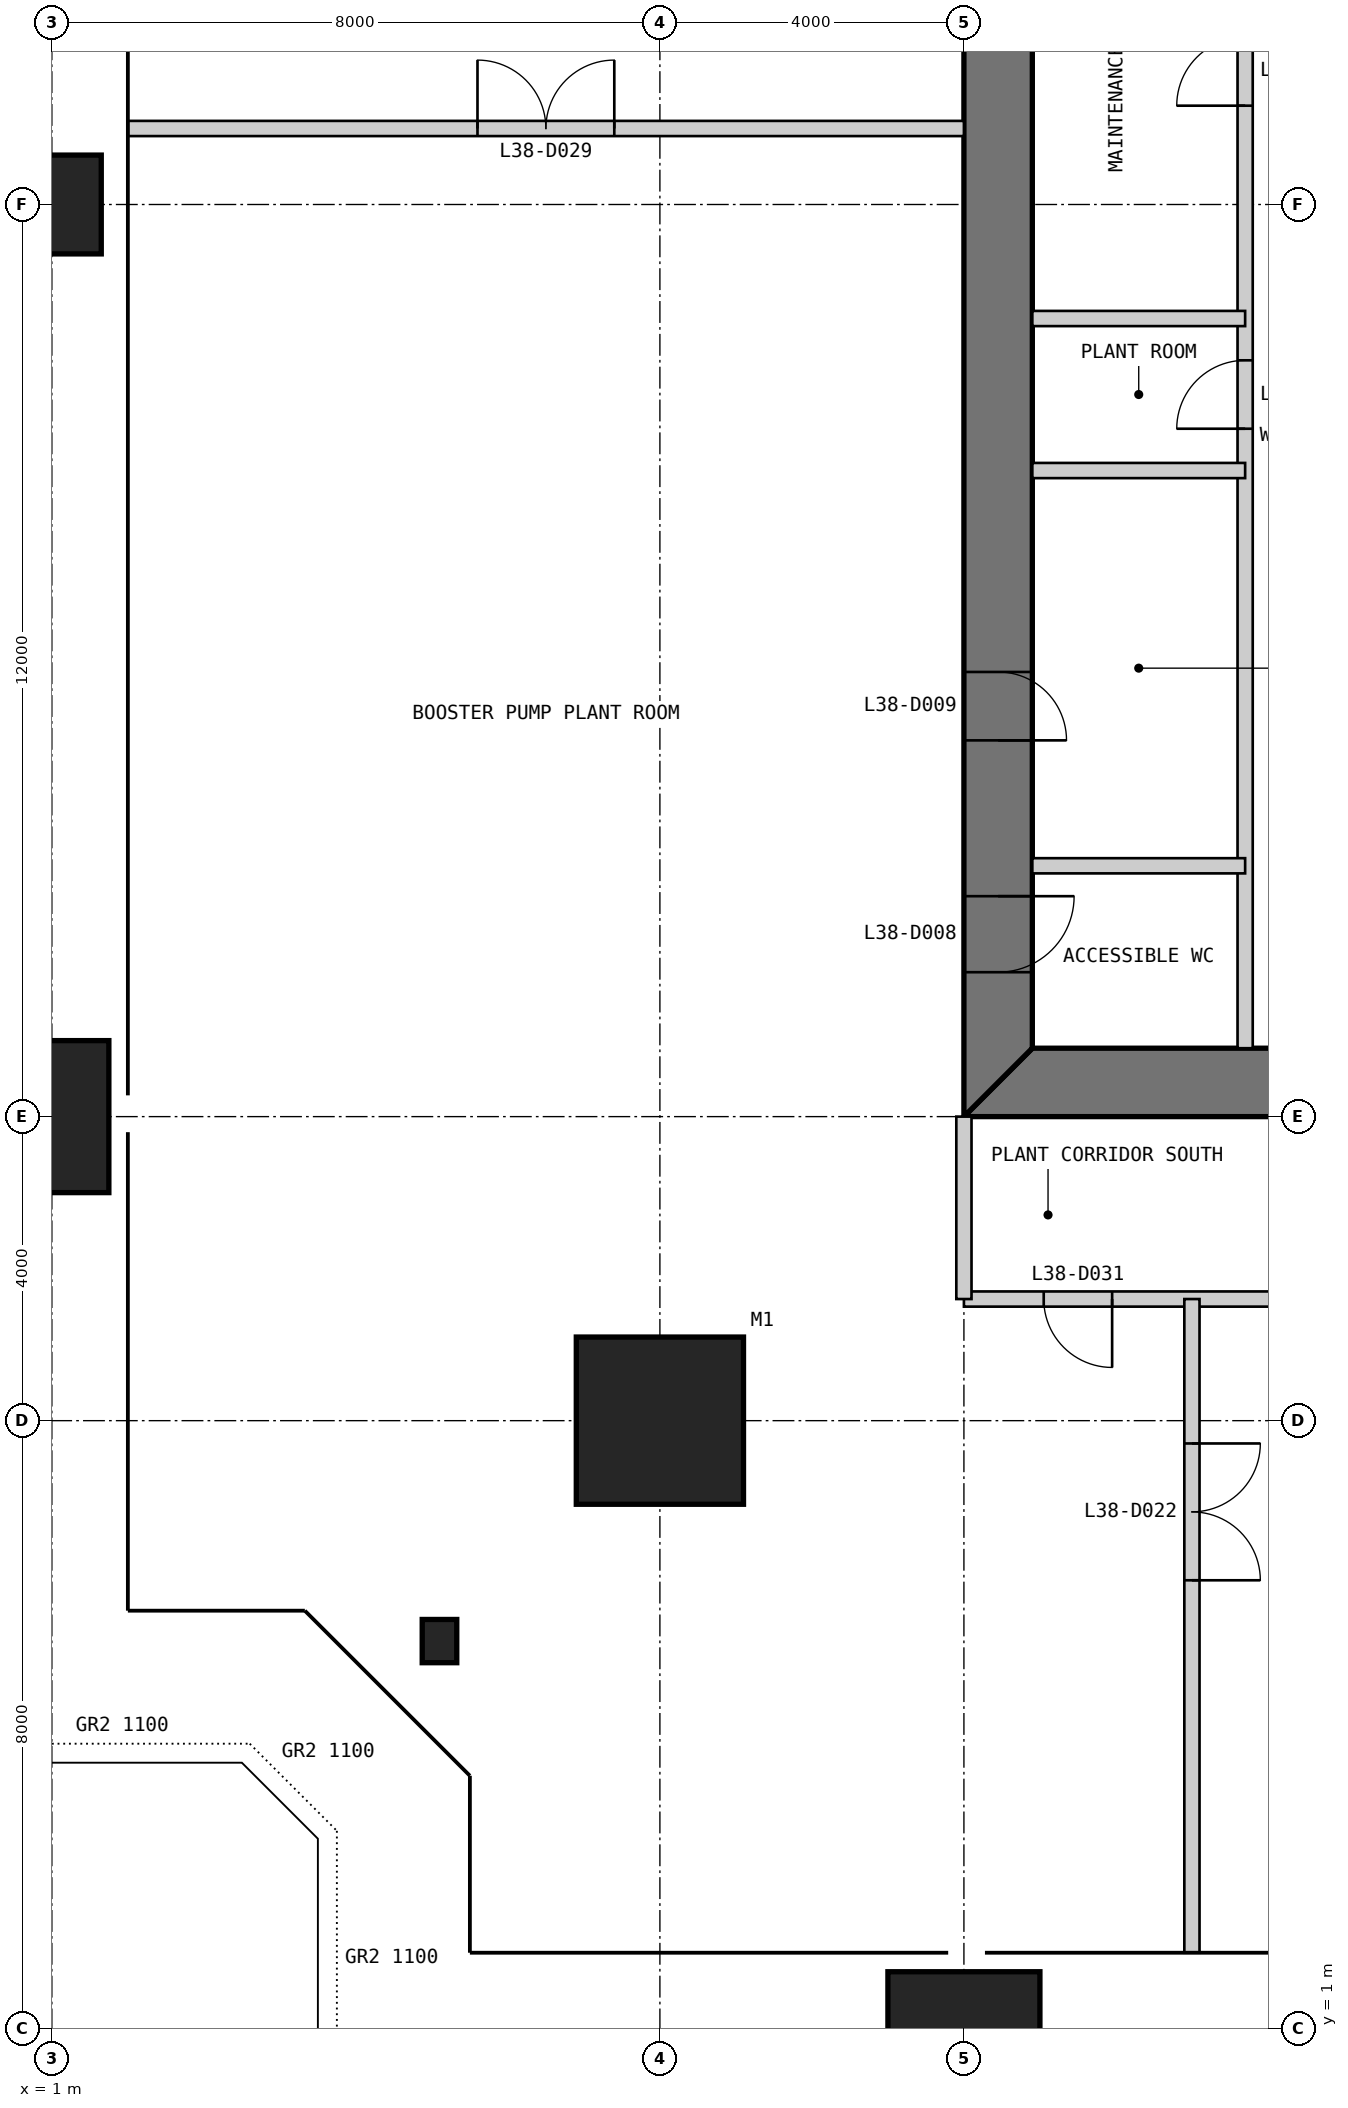
"""IFC4 building model, lengths in metres.
Left out: names, types, materials, properties, quantities, classifications, styles, units other than length and angle.
Written with IfcOpenShell. Run it as: python <this file> out.ifc"""

import sys

from ifc_helpers import new_model, si_unit, direction, frame, frame_2d, origin, origin_2d, place, context, subcontext, project, spatial, polyline, rectangle, i_section, outline, extrude, element, fill, save


model = new_model("IFC4")
c1 = context("Model", 3, precision=1e-05, world=origin(), true_north=direction((0.0, 1.0)))
c2 = subcontext(c1, "Body", "Model", "MODEL_VIEW")
j1 = project(units=[si_unit("LENGTHUNIT", "METRE"), si_unit("PLANEANGLEUNIT", "RADIAN")], contexts=[c1])
p1 = place(None, origin())
s1 = spatial("IfcSite", under=j1, at=p1, CompositionType="ELEMENT")
p2 = place(p1, origin())
s2 = spatial("IfcBuilding", under=s1, at=p2, CompositionType="ELEMENT")
p3 = place(p2, frame((0.0, 0.0, 162.4)))
s3 = spatial("IfcBuildingStorey", under=s2, at=p3, CompositionType="ELEMENT", Elevation=162.4)
p4 = place(p3, frame((9.0, 9.0, 0.0), z_axis=(0.0, 0.0, 1.0), x_axis=(1.0, 0.0, 0.0)))
e1 = element("IfcColumn", 1, at=p4, inside=s3, PredefinedType="COLUMN", context=c2, shape_type="SweptSolid", body=[
    extrude(rectangle(XDim=2.2, YDim=2.2, at=origin_2d()), origin(), (0.0, 0.0, 1.0), 6.0),
])
p5 = place(p3, frame((13.0, 1.0, 0.0), z_axis=(0.0, 0.0, 1.0), x_axis=(1.0, 0.0, 0.0)))
e2 = element("IfcColumn", 2, at=p5, inside=s3, PredefinedType="COLUMN", context=c2, shape_type="SweptSolid", body=[
    extrude(rectangle(XDim=2.0, YDim=1.5, at=origin_2d()), origin(), (0.0, 0.0, 1.0), 6.0),
])
p6 = place(p3, frame((1.0, 25.0, 0.0), z_axis=(0.0, 0.0, 1.0), x_axis=(1.0, 0.0, 0.0)))
e3 = element("IfcColumn", 3, at=p6, inside=s3, PredefinedType="COLUMN", context=c2, shape_type="SweptSolid", body=[
    extrude(rectangle(XDim=1.3, YDim=1.3, at=origin_2d()), origin(), (0.0, 0.0, 1.0), 6.0),
])
p7 = place(p3, frame((1.0, 13.0, 0.0), z_axis=(0.0, 0.0, 1.0), x_axis=(1.0, 0.0, 0.0)))
e4 = element("IfcColumn", 4, at=p7, inside=s3, PredefinedType="COLUMN", context=c2, shape_type="SweptSolid", body=[
    extrude(rectangle(XDim=1.5, YDim=2.0, at=origin_2d()), origin(), (0.0, 0.0, 1.0), 6.0),
])
p8 = place(p3, frame((6.1, 6.1, 0.0), z_axis=(0.0, 0.0, 1.0), x_axis=(1.0, 0.0, 0.0)))
e5 = element("IfcColumn", 5, at=p8, inside=s3, PredefinedType="COLUMN", context=c2, shape_type="SweptSolid", body=[
    extrude(i_section(OverallWidth=0.455, OverallDepth=0.569, WebThickness=0.078, FlangeThickness=0.125, at=origin_2d()), origin(), (0.0, 0.0, 1.0), 4.6),
])
p9 = place(p3, frame((13.0, 13.45, 0.0), z_axis=(0.0, 0.0, 1.0), x_axis=(1.0, 0.0, 0.0)))
e6 = element("IfcWall", 6, at=p9, inside=s3, PredefinedType="SHEAR", context=c2, shape_type="SweptSolid", body=[
    extrude(outline(polyline([(0.0, -0.45), (24.0, -0.45), (23.1, 0.45), (0.9, 0.45), (0.0, -0.45)])), origin(), (0.0, 0.0, 1.0), 6.0),
])
p10 = place(p9, frame((4.9, 0.0, 0.0)))
e7 = element("IfcOpeningElement", 7, at=p10, cuts=e6, PredefinedType="OPENING", context=c2, shape_type="SweptSolid", body=[
    extrude(rectangle(XDim=1.0, YDim=2.2, at=frame_2d((0.5, 1.1))), frame((0.0, 0.46, 0.0), z_axis=(0.0, -1.0, 0.0), x_axis=(1.0, 0.0, 0.0)), (0.0, 0.0, 1.0), 0.92),
])
p11 = place(p9, frame((8.9, 0.0, 0.0)))
e8 = element("IfcOpeningElement", 8, at=p11, cuts=e6, PredefinedType="OPENING", context=c2, shape_type="SweptSolid", body=[
    extrude(rectangle(XDim=1.1, YDim=2.2, at=frame_2d((0.55, 1.1))), frame((0.0, 0.46, 0.0), z_axis=(0.0, -1.0, 0.0), x_axis=(1.0, 0.0, 0.0)), (0.0, 0.0, 1.0), 0.92),
])
p12 = place(p9, frame((15.05, 0.0, 0.0)))
e9 = element("IfcOpeningElement", 9, at=p12, cuts=e6, PredefinedType="OPENING", context=c2, shape_type="SweptSolid", body=[
    extrude(rectangle(XDim=0.9, YDim=2.2, at=frame_2d((0.45, 1.1))), frame((0.0, 0.46, 0.0), z_axis=(0.0, -1.0, 0.0), x_axis=(1.0, 0.0, 0.0)), (0.0, 0.0, 1.0), 0.92),
])
p13 = place(p9, frame((17.9, 0.0, 0.0)))
e10 = element("IfcOpeningElement", 10, at=p13, cuts=e6, PredefinedType="OPENING", context=c2, shape_type="SweptSolid", body=[
    extrude(rectangle(XDim=1.0, YDim=2.2, at=frame_2d((0.5, 1.1))), frame((0.0, 0.46, 0.0), z_axis=(0.0, -1.0, 0.0), x_axis=(1.0, 0.0, 0.0)), (0.0, 0.0, 1.0), 0.92),
])
p14 = place(p9, frame((21.4, 0.0, 0.0)))
e11 = element("IfcOpeningElement", 11, at=p14, cuts=e6, PredefinedType="OPENING", context=c2, shape_type="SweptSolid", body=[
    extrude(rectangle(XDim=1.0, YDim=2.2, at=frame_2d((0.5, 1.1))), frame((0.0, 0.46, 0.0), z_axis=(0.0, -1.0, 0.0), x_axis=(1.0, 0.0, 0.0)), (0.0, 0.0, 1.0), 0.92),
])
p15 = place(p3, frame((13.45, 36.1, 0.0), z_axis=(0.0, 0.0, 1.0), x_axis=(0.0, -1.0, 0.0)))
e12 = element("IfcWall", 12, at=p15, inside=s3, PredefinedType="SHEAR", context=c2, shape_type="SweptSolid", body=[
    extrude(outline(polyline([(-0.9, -0.45), (23.1, -0.45), (22.2, 0.45), (0.0, 0.45), (-0.9, -0.45)])), origin(), (0.0, 0.0, 1.0), 6.0),
])
p16 = place(p15, frame((20.2, 0.0, 0.0)))
e13 = element("IfcOpeningElement", 13, at=p16, cuts=e12, PredefinedType="OPENING", context=c2, shape_type="SweptSolid", body=[
    extrude(rectangle(XDim=1.0, YDim=2.2, at=frame_2d((0.5, 1.1))), frame((0.0, 0.46, 0.0), z_axis=(0.0, -1.0, 0.0), x_axis=(1.0, 0.0, 0.0)), (0.0, 0.0, 1.0), 0.92),
])
p17 = place(p15, frame((17.25, 0.0, 0.0)))
e14 = element("IfcOpeningElement", 14, at=p17, cuts=e12, PredefinedType="OPENING", context=c2, shape_type="SweptSolid", body=[
    extrude(rectangle(XDim=0.9, YDim=2.2, at=frame_2d((0.45, 1.1))), frame((0.0, 0.46, 0.0), z_axis=(0.0, -1.0, 0.0), x_axis=(1.0, 0.0, 0.0)), (0.0, 0.0, 1.0), 0.92),
])
p18 = place(p3, frame((16.7, 13.9, 0.0), z_axis=(0.0, 0.0, 1.0), x_axis=(0.0, 1.0, 0.0)))
e15 = element("IfcWall", 15, at=p18, inside=s3, PredefinedType="PARTITIONING", context=c2, shape_type="SweptSolid", body=[
    extrude(rectangle(XDim=16.1, YDim=0.2, at=frame_2d((8.05, 0.0))), origin(), (0.0, 0.0, 1.0), 5.8),
])
p19 = place(p18, frame((8.15, 0.0, 0.0)))
e16 = element("IfcOpeningElement", 16, at=p19, cuts=e15, PredefinedType="OPENING", context=c2, shape_type="SweptSolid", body=[
    extrude(rectangle(XDim=0.9, YDim=2.2, at=frame_2d((0.45, 1.1))), frame((0.0, 0.11, 0.0), z_axis=(0.0, -1.0, 0.0), x_axis=(1.0, 0.0, 0.0)), (0.0, 0.0, 1.0), 0.22),
])
p20 = place(p18, frame((12.4, 0.0, 0.0)))
e17 = element("IfcOpeningElement", 17, at=p20, cuts=e15, PredefinedType="OPENING", context=c2, shape_type="SweptSolid", body=[
    extrude(rectangle(XDim=0.9, YDim=2.2, at=frame_2d((0.45, 1.1))), frame((0.0, 0.11, 0.0), z_axis=(0.0, -1.0, 0.0), x_axis=(1.0, 0.0, 0.0)), (0.0, 0.0, 1.0), 0.22),
])
for number, where, z_axis, x_axis in (
    (18, (13.9, 16.3, 0.0), (0.0, 0.0, 1.0), (1.0, 0.0, 0.0)),
    (19, (13.9, 21.5, 0.0), (0.0, 0.0, 1.0), (1.0, 0.0, 0.0)),
    (20, (13.9, 23.5, 0.0), (0.0, 0.0, 1.0), (1.0, 0.0, 0.0)),
):
    element("IfcWall", number, at=place(p3, frame(where, z_axis=z_axis, x_axis=x_axis)), inside=s3, PredefinedType="PARTITIONING", context=c2, shape_type="SweptSolid", body=[
        extrude(rectangle(XDim=2.8, YDim=0.2, at=frame_2d((1.4, 0.0))), origin(), (0.0, 0.0, 1.0), 5.8),
    ])
p21 = place(p3, frame((13.0, 10.6, 0.0), z_axis=(0.0, 0.0, 1.0), x_axis=(1.0, 0.0, 0.0)))
e21 = element("IfcWall", 21, at=p21, inside=s3, PredefinedType="PARTITIONING", context=c2, shape_type="SweptSolid", body=[
    extrude(rectangle(XDim=24.0, YDim=0.2, at=frame_2d((12.0, 0.0))), origin(), (0.0, 0.0, 1.0), 5.8),
])
p22 = place(p21, frame((1.05, 0.0, 0.0)))
e22 = element("IfcOpeningElement", 22, at=p22, cuts=e21, PredefinedType="OPENING", context=c2, shape_type="SweptSolid", body=[
    extrude(rectangle(XDim=0.9, YDim=2.2, at=frame_2d((0.45, 1.1))), frame((0.0, 0.11, 0.0), z_axis=(0.0, -1.0, 0.0), x_axis=(1.0, 0.0, 0.0)), (0.0, 0.0, 1.0), 0.22),
])
p23 = place(p21, frame((7.1, 0.0, 0.0)))
e23 = element("IfcOpeningElement", 23, at=p23, cuts=e21, PredefinedType="OPENING", context=c2, shape_type="SweptSolid", body=[
    extrude(rectangle(XDim=1.8, YDim=2.4, at=frame_2d((0.9, 1.2))), frame((0.0, 0.11, 0.0), z_axis=(0.0, -1.0, 0.0), x_axis=(1.0, 0.0, 0.0)), (0.0, 0.0, 1.0), 0.22),
])
p24 = place(p21, frame((15.6, 0.0, 0.0)))
e24 = element("IfcOpeningElement", 24, at=p24, cuts=e21, PredefinedType="OPENING", context=c2, shape_type="SweptSolid", body=[
    extrude(rectangle(XDim=1.8, YDim=2.4, at=frame_2d((0.9, 1.2))), frame((0.0, 0.11, 0.0), z_axis=(0.0, -1.0, 0.0), x_axis=(1.0, 0.0, 0.0)), (0.0, 0.0, 1.0), 0.22),
])
p25 = place(p21, frame((21.1, 0.0, 0.0)))
e25 = element("IfcOpeningElement", 25, at=p25, cuts=e21, PredefinedType="OPENING", context=c2, shape_type="SweptSolid", body=[
    extrude(rectangle(XDim=1.8, YDim=2.4, at=frame_2d((0.9, 1.2))), frame((0.0, 0.11, 0.0), z_axis=(0.0, -1.0, 0.0), x_axis=(1.0, 0.0, 0.0)), (0.0, 0.0, 1.0), 0.22),
])
p26 = place(p3, frame((13.0, 10.6, 0.0), z_axis=(0.0, 0.0, 1.0), x_axis=(0.0, 1.0, 0.0)))
e26 = element("IfcWall", 26, at=p26, inside=s3, PredefinedType="PARTITIONING", context=c2, shape_type="SweptSolid", body=[
    extrude(rectangle(XDim=2.4, YDim=0.2, at=frame_2d((1.2, 0.0))), origin(), (0.0, 0.0, 1.0), 4.807),
])
p27 = place(p3, frame((16.0, 2.0, 0.0), z_axis=(0.0, 0.0, 1.0), x_axis=(0.0, 1.0, 0.0)))
e27 = element("IfcWall", 27, at=p27, inside=s3, PredefinedType="PARTITIONING", context=c2, shape_type="SweptSolid", body=[
    extrude(rectangle(XDim=8.6, YDim=0.2, at=frame_2d((4.3, 0.0))), origin(), (0.0, 0.0, 1.0), 4.954),
])
p28 = place(p27, frame((4.9, 0.0, 0.0)))
e28 = element("IfcOpeningElement", 28, at=p28, cuts=e27, PredefinedType="OPENING", context=c2, shape_type="SweptSolid", body=[
    extrude(rectangle(XDim=1.8, YDim=2.4, at=frame_2d((0.9, 1.2))), frame((0.0, 0.11, 0.0), z_axis=(0.0, -1.0, 0.0), x_axis=(1.0, 0.0, 0.0)), (0.0, 0.0, 1.0), 0.22),
])
p29 = place(p3, frame((2.0, 26.0, 0.0), z_axis=(0.0, 0.0, 1.0), x_axis=(1.0, 0.0, 0.0)))
e29 = element("IfcWall", 29, at=p29, inside=s3, PredefinedType="PARTITIONING", context=c2, shape_type="SweptSolid", body=[
    extrude(rectangle(XDim=11.0, YDim=0.2, at=frame_2d((5.5, 0.0))), origin(), (0.0, 0.0, 1.0), 5.8),
])
p30 = place(p29, frame((4.6, 0.0, 0.0)))
e30 = element("IfcOpeningElement", 30, at=p30, cuts=e29, PredefinedType="OPENING", context=c2, shape_type="SweptSolid", body=[
    extrude(rectangle(XDim=1.8, YDim=2.4, at=frame_2d((0.9, 1.2))), frame((0.0, 0.11, 0.0), z_axis=(0.0, -1.0, 0.0), x_axis=(1.0, 0.0, 0.0)), (0.0, 0.0, 1.0), 0.22),
])
p31 = place(p16, origin())
e31 = element("IfcDoor", 31, at=p31, inside=s3, OperationType="SINGLE_SWING_LEFT", PredefinedType="DOOR", context=c2, shape_type="SweptSolid", body=[
    extrude(rectangle(XDim=1.0, YDim=2.2, at=frame_2d((0.5, 1.1))), frame((0.0, 0.025, 0.0), z_axis=(0.0, -1.0, 0.0), x_axis=(1.0, 0.0, 0.0)), (0.0, 0.0, 1.0), 0.05),
    extrude(outline(polyline([(0.0, 0.0), (0.04, 0.0), (0.04, 2.16), (0.96, 2.16), (0.96, 0.0), (1.0, 0.0), (1.0, 2.2), (0.0, 2.2), (0.0, 0.0)])), frame((0.0, 0.3, 0.0), z_axis=(0.0, -1.0, 0.0), x_axis=(1.0, 0.0, 0.0)), (0.0, 0.0, 1.0), 0.6),
])
fill(e13, e31)
p32 = place(p17, origin())
e32 = element("IfcDoor", 32, at=p32, inside=s3, OperationType="SINGLE_SWING_RIGHT", PredefinedType="DOOR", context=c2, shape_type="SweptSolid", body=[
    extrude(rectangle(XDim=0.9, YDim=2.2, at=frame_2d((0.45, 1.1))), frame((0.0, 0.025, 0.0), z_axis=(0.0, -1.0, 0.0), x_axis=(1.0, 0.0, 0.0)), (0.0, 0.0, 1.0), 0.05),
    extrude(outline(polyline([(0.0, 0.0), (0.04, 0.0), (0.04, 2.16), (0.86, 2.16), (0.86, 0.0), (0.9, 0.0), (0.9, 2.2), (0.0, 2.2), (0.0, 0.0)])), frame((0.0, 0.3, 0.0), z_axis=(0.0, -1.0, 0.0), x_axis=(1.0, 0.0, 0.0)), (0.0, 0.0, 1.0), 0.6),
])
fill(e14, e32)
p33 = place(p19, origin())
e33 = element("IfcDoor", 33, at=p33, inside=s3, OperationType="SINGLE_SWING_LEFT", PredefinedType="DOOR", context=c2, shape_type="SweptSolid", body=[
    extrude(rectangle(XDim=0.9, YDim=2.2, at=frame_2d((0.45, 1.1))), frame((0.0, 0.025, 0.0), z_axis=(0.0, -1.0, 0.0), x_axis=(1.0, 0.0, 0.0)), (0.0, 0.0, 1.0), 0.05),
])
fill(e16, e33)
p34 = place(p20, origin())
e34 = element("IfcDoor", 34, at=p34, inside=s3, OperationType="SINGLE_SWING_LEFT", PredefinedType="DOOR", context=c2, shape_type="SweptSolid", body=[
    extrude(rectangle(XDim=0.9, YDim=2.2, at=frame_2d((0.45, 1.1))), frame((0.0, 0.025, 0.0), z_axis=(0.0, -1.0, 0.0), x_axis=(1.0, 0.0, 0.0)), (0.0, 0.0, 1.0), 0.05),
])
fill(e17, e34)
p35 = place(p28, frame((1.8, 0.0, 0.0), z_axis=(0.0, 0.0, 1.0), x_axis=(-1.0, 0.0, 0.0)))
e35 = element("IfcDoor", 35, at=p35, inside=s3, OperationType="DOUBLE_DOOR_SINGLE_SWING", PredefinedType="DOOR", context=c2, shape_type="SweptSolid", body=[
    extrude(rectangle(XDim=1.8, YDim=2.4, at=frame_2d((0.9, 1.2))), frame((0.0, 0.025, 0.0), z_axis=(0.0, -1.0, 0.0), x_axis=(1.0, 0.0, 0.0)), (0.0, 0.0, 1.0), 0.05),
])
fill(e28, e35)
p36 = place(p30, origin())
e36 = element("IfcDoor", 36, at=p36, inside=s3, OperationType="DOUBLE_DOOR_SINGLE_SWING", PredefinedType="DOOR", context=c2, shape_type="SweptSolid", body=[
    extrude(rectangle(XDim=1.8, YDim=2.4, at=frame_2d((0.9, 1.2))), frame((0.0, 0.025, 0.0), z_axis=(0.0, -1.0, 0.0), x_axis=(1.0, 0.0, 0.0)), (0.0, 0.0, 1.0), 0.05),
])
fill(e30, e36)
p37 = place(p22, frame((0.9, 0.0, 0.0), z_axis=(0.0, 0.0, 1.0), x_axis=(-1.0, 0.0, 0.0)))
e37 = element("IfcDoor", 37, at=p37, inside=s3, OperationType="SINGLE_SWING_LEFT", PredefinedType="DOOR", context=c2, shape_type="SweptSolid", body=[
    extrude(rectangle(XDim=0.9, YDim=2.2, at=frame_2d((0.45, 1.1))), frame((0.0, 0.025, 0.0), z_axis=(0.0, -1.0, 0.0), x_axis=(1.0, 0.0, 0.0)), (0.0, 0.0, 1.0), 0.05),
])
fill(e22, e37)
save(model, sys.argv[1])
